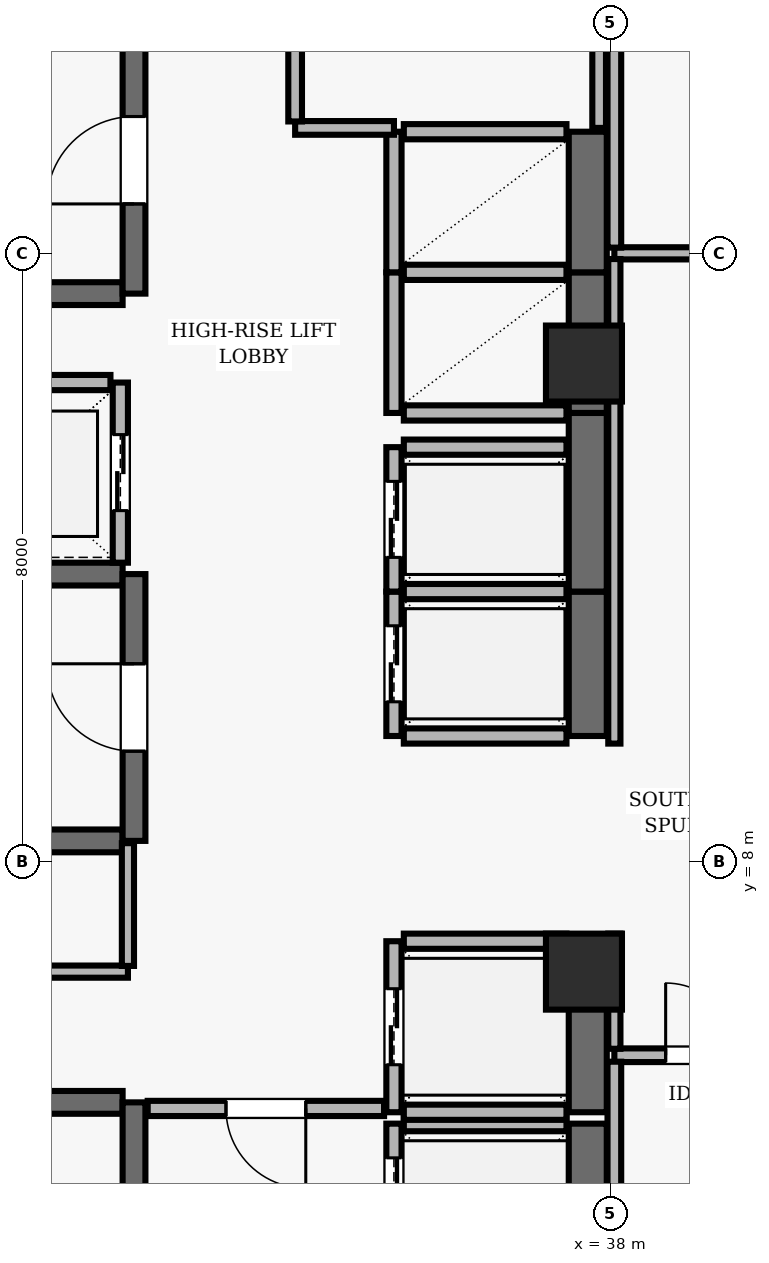
"""IFC4 building model, lengths in metres.
Left out: names, types, materials, properties, quantities, classifications, styles, units other than length and angle.
Written with IfcOpenShell. Run it as: python <this file> out.ifc"""

import sys

from ifc_helpers import new_model, si_unit, direction, frame, frame_2d, origin, origin_2d, place, context, subcontext, project, spatial, rectangle, extrude, element, fill, save


model = new_model("IFC4")
c1 = context("Model", 3, precision=1e-05, world=origin(), true_north=direction((0.0, 1.0)))
c2 = subcontext(c1, "Body", "Model", "MODEL_VIEW")
j1 = project(units=[si_unit("LENGTHUNIT", "METRE"), si_unit("PLANEANGLEUNIT", "RADIAN")], contexts=[c1])
p1 = place(None, origin())
s1 = spatial("IfcSite", under=j1, at=p1, CompositionType="ELEMENT")
p2 = place(p1, origin())
s2 = spatial("IfcBuilding", under=s1, at=p2, CompositionType="ELEMENT")
p3 = place(p2, frame((0.0, 0.0, 195.3)))
s3 = spatial("IfcBuildingStorey", under=s2, at=p3, CompositionType="ELEMENT", Elevation=195.3)
for number, where, z_axis, x_axis in (
    (1, (37.65, 6.55, 0.0), (0.0, 0.0, 1.0), (1.0, 0.0, 0.0)),
    (2, (37.65, 14.55, 0.0), (0.0, 0.0, 1.0), (1.0, 0.0, 0.0)),
):
    element("IfcColumn", number, at=place(p3, frame(where, z_axis=z_axis, x_axis=x_axis)), inside=s3, PredefinedType="COLUMN", context=c2, shape_type="SweptSolid", body=[
        extrude(rectangle(XDim=1.0, YDim=1.0, at=origin_2d()), origin(), (0.0, 0.0, 1.0), 3.9),
    ])
p4 = place(p3, frame((31.58, 4.83, 0.0), z_axis=(0.0, 0.0, 1.0), x_axis=(-1.0, 0.0, 0.0)))
e3 = element("IfcWall", 3, at=p4, inside=s3, PredefinedType="SHEAR", context=c2, shape_type="SweptSolid", body=[
    extrude(rectangle(XDim=8.36, YDim=0.3, at=frame_2d((4.18, 0.0))), origin(), (0.0, 0.0, 1.0), 3.69),
])
p5 = place(p3, frame((31.73, 0.96, 0.0), z_axis=(0.0, 0.0, 1.0), x_axis=(0.0, 1.0, 0.0)))
e4 = element("IfcWall", 4, at=p5, inside=s3, PredefinedType="SHEAR", context=c2, shape_type="SweptSolid", body=[
    extrude(rectangle(XDim=3.87, YDim=0.3, at=frame_2d((1.935, 0.0))), origin(), (0.0, 0.0, 1.0), 3.69),
])
p6 = place(p5, frame((1.54, 0.0, 0.0)))
e5 = element("IfcOpeningElement", 5, at=p6, cuts=e4, PredefinedType="OPENING", context=c2, shape_type="SweptSolid", body=[
    extrude(rectangle(XDim=1.15, YDim=2.15, at=frame_2d((0.575, 1.075))), frame((0.0, 0.16, 0.0), z_axis=(0.0, -1.0, 0.0), x_axis=(1.0, 0.0, 0.0)), (0.0, 0.0, 1.0), 0.32),
])
p7 = place(p3, frame((23.22, 15.47, 0.0), z_axis=(0.0, 0.0, 1.0), x_axis=(1.0, 0.0, 0.0)))
e6 = element("IfcWall", 6, at=p7, inside=s3, PredefinedType="SHEAR", context=c2, shape_type="SweptSolid", body=[
    extrude(rectangle(XDim=8.36, YDim=0.3, at=frame_2d((4.18, 0.0))), origin(), (0.0, 0.0, 1.0), 3.69),
])
p8 = place(p3, frame((31.73, 15.47, 0.0), z_axis=(0.0, 0.0, 1.0), x_axis=(0.0, 1.0, 0.0)))
e7 = element("IfcWall", 7, at=p8, inside=s3, PredefinedType="SHEAR", context=c2, shape_type="SweptSolid", body=[
    extrude(rectangle(XDim=3.51, YDim=0.3, at=frame_2d((1.755, 0.0))), origin(), (0.0, 0.0, 1.0), 3.69),
])
p9 = place(p8, frame((1.18, 0.0, 0.0)))
e8 = element("IfcOpeningElement", 8, at=p9, cuts=e7, PredefinedType="OPENING", context=c2, shape_type="SweptSolid", body=[
    extrude(rectangle(XDim=1.15, YDim=2.15, at=frame_2d((0.575, 1.075))), frame((0.0, 0.16, 0.0), z_axis=(0.0, -1.0, 0.0), x_axis=(1.0, 0.0, 0.0)), (0.0, 0.0, 1.0), 0.32),
])
for number, where, z_axis, x_axis in (
    (9, (31.58, 11.78, 0.0), (0.0, 0.0, 1.0), (-1.0, 0.0, 0.0)),
    (10, (23.22, 8.27, 0.0), (0.0, 0.0, 1.0), (1.0, 0.0, 0.0)),
):
    element("IfcWall", number, at=place(p3, frame(where, z_axis=z_axis, x_axis=x_axis)), inside=s3, PredefinedType="SHEAR", context=c2, shape_type="SweptSolid", body=[
        extrude(rectangle(XDim=8.36, YDim=0.3, at=frame_2d((4.18, 0.0))), origin(), (0.0, 0.0, 1.0), 3.69),
    ])
p10 = place(p3, frame((31.73, 8.27, 0.0), z_axis=(0.0, 0.0, 1.0), x_axis=(0.0, 1.0, 0.0)))
e11 = element("IfcWall", 11, at=p10, inside=s3, PredefinedType="SHEAR", context=c2, shape_type="SweptSolid", body=[
    extrude(rectangle(XDim=3.51, YDim=0.3, at=frame_2d((1.755, 0.0))), origin(), (0.0, 0.0, 1.0), 3.69),
])
p11 = place(p10, frame((1.18, 0.0, 0.0)))
e12 = element("IfcOpeningElement", 12, at=p11, cuts=e11, PredefinedType="OPENING", context=c2, shape_type="SweptSolid", body=[
    extrude(rectangle(XDim=1.15, YDim=2.15, at=frame_2d((0.575, 1.075))), frame((0.0, 0.16, 0.0), z_axis=(0.0, -1.0, 0.0), x_axis=(1.0, 0.0, 0.0)), (0.0, 0.0, 1.0), 0.32),
])
p12 = place(p3, frame((35.15, 4.55, 0.0), z_axis=(0.0, 0.0, 1.0), x_axis=(0.0, -1.0, 0.0)))
e13 = element("IfcWall", 13, at=p12, inside=s3, PredefinedType="SOLIDWALL", context=c2, shape_type="SweptSolid", body=[
    extrude(rectangle(XDim=2.1, YDim=0.2, at=frame_2d((1.05, 0.0))), origin(), (0.0, 0.0, 1.0), 3.69),
])
p13 = place(p12, frame((0.45, 0.0, 0.0)))
e14 = element("IfcOpeningElement", 14, at=p13, cuts=e13, PredefinedType="OPENING", context=c2, shape_type="SweptSolid", body=[
    extrude(rectangle(XDim=1.2, YDim=2.15, at=frame_2d((0.6, 1.075))), frame((0.0, 0.11, 0.0), z_axis=(0.0, -1.0, 0.0), x_axis=(1.0, 0.0, 0.0)), (0.0, 0.0, 1.0), 0.22),
])
p14 = place(p3, frame((37.7, 2.45, 0.0), z_axis=(0.0, 0.0, 1.0), x_axis=(0.0, 1.0, 0.0)))
e15 = element("IfcWall", 15, at=p14, inside=s3, PredefinedType="SHEAR", context=c2, shape_type="SweptSolid", body=[
    extrude(rectangle(XDim=2.1, YDim=0.5, at=frame_2d((1.05, 0.0))), origin(), (0.0, 0.0, 1.0), 3.69),
])
p15 = place(p3, frame((37.42, 4.55, 0.0), z_axis=(0.0, 0.0, 1.0), x_axis=(-1.0, 0.0, 0.0)))
e16 = element("IfcWall", 16, at=p15, inside=s3, PredefinedType="SOLIDWALL", context=c2, shape_type="SweptSolid", body=[
    extrude(rectangle(XDim=2.14, YDim=0.2, at=frame_2d((1.07, 0.0))), origin(), (0.0, 0.0, 1.0), 3.69),
])
p16 = place(p3, frame((35.15, 6.95, 0.0), z_axis=(0.0, 0.0, 1.0), x_axis=(0.0, -1.0, 0.0)))
e17 = element("IfcWall", 17, at=p16, inside=s3, PredefinedType="SOLIDWALL", context=c2, shape_type="SweptSolid", body=[
    extrude(rectangle(XDim=2.25, YDim=0.2, at=frame_2d((1.125, 0.0))), origin(), (0.0, 0.0, 1.0), 3.69),
])
p17 = place(p16, frame((0.625, 0.0, 0.0)))
e18 = element("IfcOpeningElement", 18, at=p17, cuts=e17, PredefinedType="OPENING", context=c2, shape_type="SweptSolid", body=[
    extrude(rectangle(XDim=1.0, YDim=2.1, at=frame_2d((0.5, 1.05))), frame((0.0, 0.11, 0.0), z_axis=(0.0, -1.0, 0.0), x_axis=(1.0, 0.0, 0.0)), (0.0, 0.0, 1.0), 0.22),
])
p18 = place(p3, frame((37.7, 4.7, 0.0), z_axis=(0.0, 0.0, 1.0), x_axis=(0.0, 1.0, 0.0)))
e19 = element("IfcWall", 19, at=p18, inside=s3, PredefinedType="SHEAR", context=c2, shape_type="SweptSolid", body=[
    extrude(rectangle(XDim=2.25, YDim=0.5, at=frame_2d((1.125, 0.0))), origin(), (0.0, 0.0, 1.0), 3.69),
])
for number, where, z_axis, x_axis in (
    (20, (35.28, 4.7, 0.0), (0.0, 0.0, 1.0), (1.0, 0.0, 0.0)),
    (21, (37.42, 6.95, 0.0), (0.0, 0.0, 1.0), (-1.0, 0.0, 0.0)),
):
    element("IfcWall", number, at=place(p3, frame(where, z_axis=z_axis, x_axis=x_axis)), inside=s3, PredefinedType="SOLIDWALL", context=c2, shape_type="SweptSolid", body=[
        extrude(rectangle(XDim=2.14, YDim=0.2, at=frame_2d((1.07, 0.0))), origin(), (0.0, 0.0, 1.0), 3.69),
    ])
p19 = place(p3, frame((35.15, 11.55, 0.0), z_axis=(0.0, 0.0, 1.0), x_axis=(0.0, -1.0, 0.0)))
e22 = element("IfcWall", 22, at=p19, inside=s3, PredefinedType="SOLIDWALL", context=c2, shape_type="SweptSolid", body=[
    extrude(rectangle(XDim=1.9, YDim=0.2, at=frame_2d((0.95, 0.0))), origin(), (0.0, 0.0, 1.0), 3.69),
])
p20 = place(p19, frame((0.45, 0.0, 0.0)))
e23 = element("IfcOpeningElement", 23, at=p20, cuts=e22, PredefinedType="OPENING", context=c2, shape_type="SweptSolid", body=[
    extrude(rectangle(XDim=1.0, YDim=2.1, at=frame_2d((0.5, 1.05))), frame((0.0, 0.11, 0.0), z_axis=(0.0, -1.0, 0.0), x_axis=(1.0, 0.0, 0.0)), (0.0, 0.0, 1.0), 0.22),
])
p21 = place(p3, frame((37.7, 9.65, 0.0), z_axis=(0.0, 0.0, 1.0), x_axis=(0.0, 1.0, 0.0)))
e24 = element("IfcWall", 24, at=p21, inside=s3, PredefinedType="SHEAR", context=c2, shape_type="SweptSolid", body=[
    extrude(rectangle(XDim=1.9, YDim=0.5, at=frame_2d((0.95, 0.0))), origin(), (0.0, 0.0, 1.0), 3.69),
])
for number, where, z_axis, x_axis in (
    (25, (35.28, 9.65, 0.0), (0.0, 0.0, 1.0), (1.0, 0.0, 0.0)),
    (26, (37.42, 11.55, 0.0), (0.0, 0.0, 1.0), (-1.0, 0.0, 0.0)),
):
    element("IfcWall", number, at=place(p3, frame(where, z_axis=z_axis, x_axis=x_axis)), inside=s3, PredefinedType="SOLIDWALL", context=c2, shape_type="SweptSolid", body=[
        extrude(rectangle(XDim=2.14, YDim=0.2, at=frame_2d((1.07, 0.0))), origin(), (0.0, 0.0, 1.0), 3.69),
    ])
p22 = place(p3, frame((35.15, 13.45, 0.0), z_axis=(0.0, 0.0, 1.0), x_axis=(0.0, -1.0, 0.0)))
e27 = element("IfcWall", 27, at=p22, inside=s3, PredefinedType="SOLIDWALL", context=c2, shape_type="SweptSolid", body=[
    extrude(rectangle(XDim=1.9, YDim=0.2, at=frame_2d((0.95, 0.0))), origin(), (0.0, 0.0, 1.0), 3.69),
])
p23 = place(p22, frame((0.45, 0.0, 0.0)))
e28 = element("IfcOpeningElement", 28, at=p23, cuts=e27, PredefinedType="OPENING", context=c2, shape_type="SweptSolid", body=[
    extrude(rectangle(XDim=1.0, YDim=2.1, at=frame_2d((0.5, 1.05))), frame((0.0, 0.11, 0.0), z_axis=(0.0, -1.0, 0.0), x_axis=(1.0, 0.0, 0.0)), (0.0, 0.0, 1.0), 0.22),
])
p24 = place(p3, frame((37.7, 11.55, 0.0), z_axis=(0.0, 0.0, 1.0), x_axis=(0.0, 1.0, 0.0)))
e29 = element("IfcWall", 29, at=p24, inside=s3, PredefinedType="SHEAR", context=c2, shape_type="SweptSolid", body=[
    extrude(rectangle(XDim=2.35, YDim=0.5, at=frame_2d((1.175, 0.0))), origin(), (0.0, 0.0, 1.0), 3.69),
])
p25 = place(p3, frame((37.42, 13.45, 0.0), z_axis=(0.0, 0.0, 1.0), x_axis=(-1.0, 0.0, 0.0)))
e30 = element("IfcWall", 30, at=p25, inside=s3, PredefinedType="SOLIDWALL", context=c2, shape_type="SweptSolid", body=[
    extrude(rectangle(XDim=2.14, YDim=0.2, at=frame_2d((1.07, 0.0))), origin(), (0.0, 0.0, 1.0), 3.69),
])
p26 = place(p3, frame((31.55, 11.93, 0.0), z_axis=(0.0, 0.0, 1.0), x_axis=(0.0, 1.0, 0.0)))
e31 = element("IfcWall", 31, at=p26, inside=s3, PredefinedType="SOLIDWALL", context=c2, shape_type="SweptSolid", body=[
    extrude(rectangle(XDim=2.37, YDim=0.2, at=frame_2d((1.185, 0.0))), origin(), (0.0, 0.0, 1.0), 3.69),
])
p27 = place(p26, frame((0.685, 0.0, 0.0)))
e32 = element("IfcOpeningElement", 32, at=p27, cuts=e31, PredefinedType="OPENING", context=c2, shape_type="SweptSolid", body=[
    extrude(rectangle(XDim=1.0, YDim=2.1, at=frame_2d((0.5, 1.05))), frame((0.0, 0.11, 0.0), z_axis=(0.0, -1.0, 0.0), x_axis=(1.0, 0.0, 0.0)), (0.0, 0.0, 1.0), 0.22),
])
p28 = place(p3, frame((31.42, 14.3, 0.0), z_axis=(0.0, 0.0, 1.0), x_axis=(-1.0, 0.0, 0.0)))
e33 = element("IfcWall", 33, at=p28, inside=s3, PredefinedType="SOLIDWALL", context=c2, shape_type="SweptSolid", body=[
    extrude(rectangle(XDim=2.44, YDim=0.2, at=frame_2d((1.22, 0.0))), origin(), (0.0, 0.0, 1.0), 3.69),
])
p29 = place(p3, frame((35.15, 15.75, 0.0), z_axis=(0.0, 0.0, 1.0), x_axis=(0.0, -1.0, 0.0)))
e34 = element("IfcWall", 34, at=p29, inside=s3, PredefinedType="SOLIDWALL", context=c2, shape_type="SweptSolid", body=[
    extrude(rectangle(XDim=1.85, YDim=0.2, at=frame_2d((0.925, 0.0))), origin(), (0.0, 0.0, 1.0), 3.69),
])
p30 = place(p3, frame((37.7, 13.9, 0.0), z_axis=(0.0, 0.0, 1.0), x_axis=(0.0, 1.0, 0.0)))
e35 = element("IfcWall", 35, at=p30, inside=s3, PredefinedType="SHEAR", context=c2, shape_type="SweptSolid", body=[
    extrude(rectangle(XDim=1.85, YDim=0.5, at=frame_2d((0.925, 0.0))), origin(), (0.0, 0.0, 1.0), 3.69),
])
for number, where, z_axis, x_axis in (
    (36, (35.28, 13.9, 0.0), (0.0, 0.0, 1.0), (1.0, 0.0, 0.0)),
    (37, (37.42, 15.75, 0.0), (0.0, 0.0, 1.0), (-1.0, 0.0, 0.0)),
):
    element("IfcWall", number, at=place(p3, frame(where, z_axis=z_axis, x_axis=x_axis)), inside=s3, PredefinedType="SOLIDWALL", context=c2, shape_type="SweptSolid", body=[
        extrude(rectangle(XDim=2.14, YDim=0.2, at=frame_2d((1.07, 0.0))), origin(), (0.0, 0.0, 1.0), 3.69),
    ])
p31 = place(p3, frame((35.15, 17.6, 0.0), z_axis=(0.0, 0.0, 1.0), x_axis=(0.0, -1.0, 0.0)))
e38 = element("IfcWall", 38, at=p31, inside=s3, PredefinedType="SOLIDWALL", context=c2, shape_type="SweptSolid", body=[
    extrude(rectangle(XDim=1.85, YDim=0.2, at=frame_2d((0.925, 0.0))), origin(), (0.0, 0.0, 1.0), 3.69),
])
p32 = place(p3, frame((37.7, 15.75, 0.0), z_axis=(0.0, 0.0, 1.0), x_axis=(0.0, 1.0, 0.0)))
e39 = element("IfcWall", 39, at=p32, inside=s3, PredefinedType="SHEAR", context=c2, shape_type="SweptSolid", body=[
    extrude(rectangle(XDim=1.85, YDim=0.5, at=frame_2d((0.925, 0.0))), origin(), (0.0, 0.0, 1.0), 3.69),
])
p33 = place(p3, frame((37.42, 17.6, 0.0), z_axis=(0.0, 0.0, 1.0), x_axis=(-1.0, 0.0, 0.0)))
e40 = element("IfcWall", 40, at=p33, inside=s3, PredefinedType="SOLIDWALL", context=c2, shape_type="SweptSolid", body=[
    extrude(rectangle(XDim=2.14, YDim=0.2, at=frame_2d((1.07, 0.0))), origin(), (0.0, 0.0, 1.0), 3.69),
])
p34 = place(p3, frame((31.65, 6.55, 0.0), z_axis=(0.0, 0.0, 1.0), x_axis=(-1.0, 0.0, 0.0)))
e41 = element("IfcWall", 41, at=p34, inside=s3, PredefinedType="PARTITIONING", context=c2, shape_type="SweptSolid", body=[
    extrude(rectangle(XDim=4.75, YDim=0.16, at=frame_2d((2.375, 0.0))), origin(), (0.0, 0.0, 1.0), 3.69),
])
p35 = place(p34, frame((1.935, 0.0, 0.0)))
e42 = element("IfcOpeningElement", 42, at=p35, cuts=e41, PredefinedType="OPENING", context=c2, shape_type="SweptSolid", body=[
    extrude(rectangle(XDim=0.88, YDim=2.1, at=frame_2d((0.44, 1.05))), frame((0.0, 0.09, 0.0), z_axis=(0.0, -1.0, 0.0), x_axis=(1.0, 0.0, 0.0)), (0.0, 0.0, 1.0), 0.18),
])
p36 = place(p3, frame((33.85, 17.65, 0.0), z_axis=(0.0, 0.0, 1.0), x_axis=(1.0, 0.0, 0.0)))
e43 = element("IfcWall", 43, at=p36, inside=s3, PredefinedType="PARTITIONING", context=c2, shape_type="SweptSolid", body=[
    extrude(rectangle(XDim=1.3, YDim=0.18, at=frame_2d((0.65, 0.0))), origin(), (0.0, 0.0, 1.0), 3.69),
])
p37 = place(p3, frame((35.02, 4.75, 0.0), z_axis=(0.0, 0.0, 1.0), x_axis=(-1.0, 0.0, 0.0)))
e44 = element("IfcWall", 44, at=p37, inside=s3, PredefinedType="SOLIDWALL", context=c2, shape_type="SweptSolid", body=[
    extrude(rectangle(XDim=3.11, YDim=0.2, at=frame_2d((1.555, 0.0))), origin(), (0.0, 0.0, 1.0), 3.69),
])
p38 = place(p37, frame((1.03, 0.0, 0.0)))
e45 = element("IfcOpeningElement", 45, at=p38, cuts=e44, PredefinedType="OPENING", context=c2, shape_type="SweptSolid", body=[
    extrude(rectangle(XDim=1.05, YDim=2.15, at=frame_2d((0.525, 1.075))), frame((0.0, 0.11, 0.0), z_axis=(0.0, -1.0, 0.0), x_axis=(1.0, 0.0, 0.0)), (0.0, 0.0, 1.0), 0.22),
])
p39 = place(p3, frame((38.05, 5.45, 0.0), z_axis=(0.0, 0.0, 1.0), x_axis=(1.0, 0.0, 0.0)))
e46 = element("IfcWall", 46, at=p39, inside=s3, PredefinedType="PARTITIONING", context=c2, shape_type="SweptSolid", body=[
    extrude(rectangle(XDim=2.3, YDim=0.18, at=frame_2d((1.15, 0.0))), origin(), (0.0, 0.0, 1.0), 3.372),
])
p40 = place(p39, frame((0.675, 0.0, 0.0)))
e47 = element("IfcOpeningElement", 47, at=p40, cuts=e46, PredefinedType="OPENING", context=c2, shape_type="SweptSolid", body=[
    extrude(rectangle(XDim=0.95, YDim=2.1, at=frame_2d((0.475, 1.05))), frame((0.0, 0.1, 0.0), z_axis=(0.0, -1.0, 0.0), x_axis=(1.0, 0.0, 0.0)), (0.0, 0.0, 1.0), 0.2),
])
p41 = place(p3, frame((40.35, 16.0, 0.0), z_axis=(0.0, 0.0, 1.0), x_axis=(-1.0, 0.0, 0.0)))
e48 = element("IfcWall", 48, at=p41, inside=s3, PredefinedType="PARTITIONING", context=c2, shape_type="SweptSolid", body=[
    extrude(rectangle(XDim=2.3, YDim=0.16, at=frame_2d((1.15, 0.0))), origin(), (0.0, 0.0, 1.0), 3.69),
])
p42 = place(p41, frame((0.35, 0.0, 0.0)))
e49 = element("IfcOpeningElement", 49, at=p42, cuts=e48, PredefinedType="OPENING", context=c2, shape_type="SweptSolid", body=[
    extrude(rectangle(XDim=0.9, YDim=2.1, at=frame_2d((0.45, 1.05))), frame((0.0, 0.09, 0.0), z_axis=(0.0, -1.0, 0.0), x_axis=(1.0, 0.0, 0.0)), (0.0, 0.0, 1.0), 0.18),
])
p43 = place(p3, frame((31.65, 8.24, 0.0), z_axis=(0.0, 0.0, 1.0), x_axis=(0.0, -1.0, 0.0)))
e50 = element("IfcWall", 50, at=p43, inside=s3, PredefinedType="PARTITIONING", context=c2, shape_type="SweptSolid", body=[
    extrude(rectangle(XDim=1.615, YDim=0.16, at=frame_2d((0.808, 0.0))), origin(), (0.0, 0.0, 1.0), 3.69),
])
p44 = place(p3, frame((33.85, 17.735, 0.0), z_axis=(0.0, 0.0, 1.0), x_axis=(0.0, 1.0, 0.0)))
e51 = element("IfcWall", 51, at=p44, inside=s3, PredefinedType="PARTITIONING", context=c2, shape_type="SweptSolid", body=[
    extrude(rectangle(XDim=2.93, YDim=0.18, at=frame_2d((1.465, 0.0))), origin(), (0.0, 0.0, 1.0), 3.69),
])
p45 = place(p44, frame((0.99, 0.0, 0.0)))
e52 = element("IfcOpeningElement", 52, at=p45, cuts=e51, PredefinedType="OPENING", context=c2, shape_type="SweptSolid", body=[
    extrude(rectangle(XDim=0.95, YDim=2.1, at=frame_2d((0.475, 1.05))), frame((0.0, 0.1, 0.0), z_axis=(0.0, -1.0, 0.0), x_axis=(1.0, 0.0, 0.0)), (0.0, 0.0, 1.0), 0.2),
])
p46 = place(p3, frame((37.85, 17.65, 0.0), z_axis=(0.0, 0.0, 1.0), x_axis=(0.0, 1.0, 0.0)))
e53 = element("IfcWall", 53, at=p46, inside=s3, PredefinedType="PARTITIONING", context=c2, shape_type="SweptSolid", body=[
    extrude(rectangle(XDim=3.015, YDim=0.18, at=frame_2d((1.508, 0.0))), origin(), (0.0, 0.0, 1.0), 3.146),
])
p47 = place(p3, frame((38.05, 5.365, 0.0), z_axis=(0.0, 0.0, 1.0), x_axis=(0.0, -1.0, 0.0)))
e54 = element("IfcWall", 54, at=p47, inside=s3, PredefinedType="PARTITIONING", context=c2, shape_type="SweptSolid", body=[
    extrude(rectangle(XDim=5.22, YDim=0.18, at=frame_2d((2.61, 0.0))), origin(), (0.0, 0.0, 1.0), 3.146),
])
p48 = place(p3, frame((38.05, 7.05, 0.0), z_axis=(0.0, 0.0, 1.0), x_axis=(0.0, -1.0, 0.0)))
e55 = element("IfcWall", 55, at=p48, inside=s3, PredefinedType="PARTITIONING", context=c2, shape_type="SweptSolid", body=[
    extrude(rectangle(XDim=1.515, YDim=0.16, at=frame_2d((0.758, 0.0))), origin(), (0.0, 0.0, 1.0), 3.146),
])
p49 = place(p3, frame((38.05, 15.925, 0.0), z_axis=(0.0, 0.0, 1.0), x_axis=(0.0, -1.0, 0.0)))
e56 = element("IfcWall", 56, at=p49, inside=s3, PredefinedType="PARTITIONING", context=c2, shape_type="SweptSolid", body=[
    extrude(rectangle(XDim=6.375, YDim=0.16, at=frame_2d((3.188, 0.0))), origin(), (0.0, 0.0, 1.0), 3.146),
])
p50 = place(p3, frame((38.05, 23.19, 0.0), z_axis=(0.0, 0.0, 1.0), x_axis=(0.0, -1.0, 0.0)))
e57 = element("IfcWall", 57, at=p50, inside=s3, PredefinedType="PARTITIONING", context=c2, shape_type="SweptSolid", body=[
    extrude(rectangle(XDim=7.115, YDim=0.18, at=frame_2d((3.558, 0.0))), origin(), (0.0, 0.0, 1.0), 3.146),
])
p51 = place(p9, origin())
e58 = element("IfcDoor", 58, at=p51, inside=s3, OperationType="SINGLE_SWING_LEFT", PredefinedType="DOOR", context=c2, shape_type="SweptSolid", body=[
    extrude(rectangle(XDim=1.15, YDim=2.15, at=frame_2d((0.575, 1.075))), frame((0.0, 0.025, 0.0), z_axis=(0.0, -1.0, 0.0), x_axis=(1.0, 0.0, 0.0)), (0.0, 0.0, 1.0), 0.05),
])
fill(e8, e58)
p52 = place(p11, origin())
e59 = element("IfcDoor", 59, at=p52, inside=s3, OperationType="SINGLE_SWING_RIGHT", PredefinedType="DOOR", context=c2, shape_type="SweptSolid", body=[
    extrude(rectangle(XDim=1.15, YDim=2.15, at=frame_2d((0.575, 1.075))), frame((0.0, 0.025, 0.0), z_axis=(0.0, -1.0, 0.0), x_axis=(1.0, 0.0, 0.0)), (0.0, 0.0, 1.0), 0.05),
])
fill(e12, e59)
p53 = place(p13, origin())
e60 = element("IfcDoor", 60, at=p53, inside=s3, OperationType="DOUBLE_DOOR_SLIDING", PredefinedType="DOOR", context=c2, shape_type="SweptSolid", body=[
    extrude(rectangle(XDim=1.2, YDim=2.15, at=frame_2d((0.6, 1.075))), frame((0.0, 0.025, 0.0), z_axis=(0.0, -1.0, 0.0), x_axis=(1.0, 0.0, 0.0)), (0.0, 0.0, 1.0), 0.05),
])
fill(e14, e60)
p54 = place(p17, origin())
e61 = element("IfcDoor", 61, at=p54, inside=s3, OperationType="DOUBLE_DOOR_SLIDING", PredefinedType="DOOR", context=c2, shape_type="SweptSolid", body=[
    extrude(rectangle(XDim=1.0, YDim=2.1, at=frame_2d((0.5, 1.05))), frame((0.0, 0.025, 0.0), z_axis=(0.0, -1.0, 0.0), x_axis=(1.0, 0.0, 0.0)), (0.0, 0.0, 1.0), 0.05),
])
fill(e18, e61)
p55 = place(p20, origin())
e62 = element("IfcDoor", 62, at=p55, inside=s3, OperationType="DOUBLE_DOOR_SLIDING", PredefinedType="DOOR", context=c2, shape_type="SweptSolid", body=[
    extrude(rectangle(XDim=1.0, YDim=2.1, at=frame_2d((0.5, 1.05))), frame((0.0, 0.025, 0.0), z_axis=(0.0, -1.0, 0.0), x_axis=(1.0, 0.0, 0.0)), (0.0, 0.0, 1.0), 0.05),
])
fill(e23, e62)
p56 = place(p23, origin())
e63 = element("IfcDoor", 63, at=p56, inside=s3, OperationType="DOUBLE_DOOR_SLIDING", PredefinedType="DOOR", context=c2, shape_type="SweptSolid", body=[
    extrude(rectangle(XDim=1.0, YDim=2.1, at=frame_2d((0.5, 1.05))), frame((0.0, 0.025, 0.0), z_axis=(0.0, -1.0, 0.0), x_axis=(1.0, 0.0, 0.0)), (0.0, 0.0, 1.0), 0.05),
])
fill(e28, e63)
p57 = place(p27, origin())
e64 = element("IfcDoor", 64, at=p57, inside=s3, OperationType="DOUBLE_DOOR_SLIDING", PredefinedType="DOOR", context=c2, shape_type="SweptSolid", body=[
    extrude(rectangle(XDim=1.0, YDim=2.1, at=frame_2d((0.5, 1.05))), frame((0.0, 0.025, 0.0), z_axis=(0.0, -1.0, 0.0), x_axis=(1.0, 0.0, 0.0)), (0.0, 0.0, 1.0), 0.05),
])
fill(e32, e64)
p58 = place(p38, origin())
e65 = element("IfcDoor", 65, at=p58, inside=s3, OperationType="SINGLE_SWING_LEFT", PredefinedType="DOOR", context=c2, shape_type="SweptSolid", body=[
    extrude(rectangle(XDim=1.05, YDim=2.15, at=frame_2d((0.525, 1.075))), frame((0.0, 0.025, 0.0), z_axis=(0.0, -1.0, 0.0), x_axis=(1.0, 0.0, 0.0)), (0.0, 0.0, 1.0), 0.05),
])
fill(e45, e65)
p59 = place(p40, origin())
e66 = element("IfcDoor", 66, at=p59, inside=s3, OperationType="SINGLE_SWING_LEFT", PredefinedType="DOOR", context=c2, shape_type="SweptSolid", body=[
    extrude(rectangle(XDim=0.95, YDim=2.1, at=frame_2d((0.475, 1.05))), frame((0.0, 0.025, 0.0), z_axis=(0.0, -1.0, 0.0), x_axis=(1.0, 0.0, 0.0)), (0.0, 0.0, 1.0), 0.05),
])
fill(e47, e66)
save(model, sys.argv[1])
